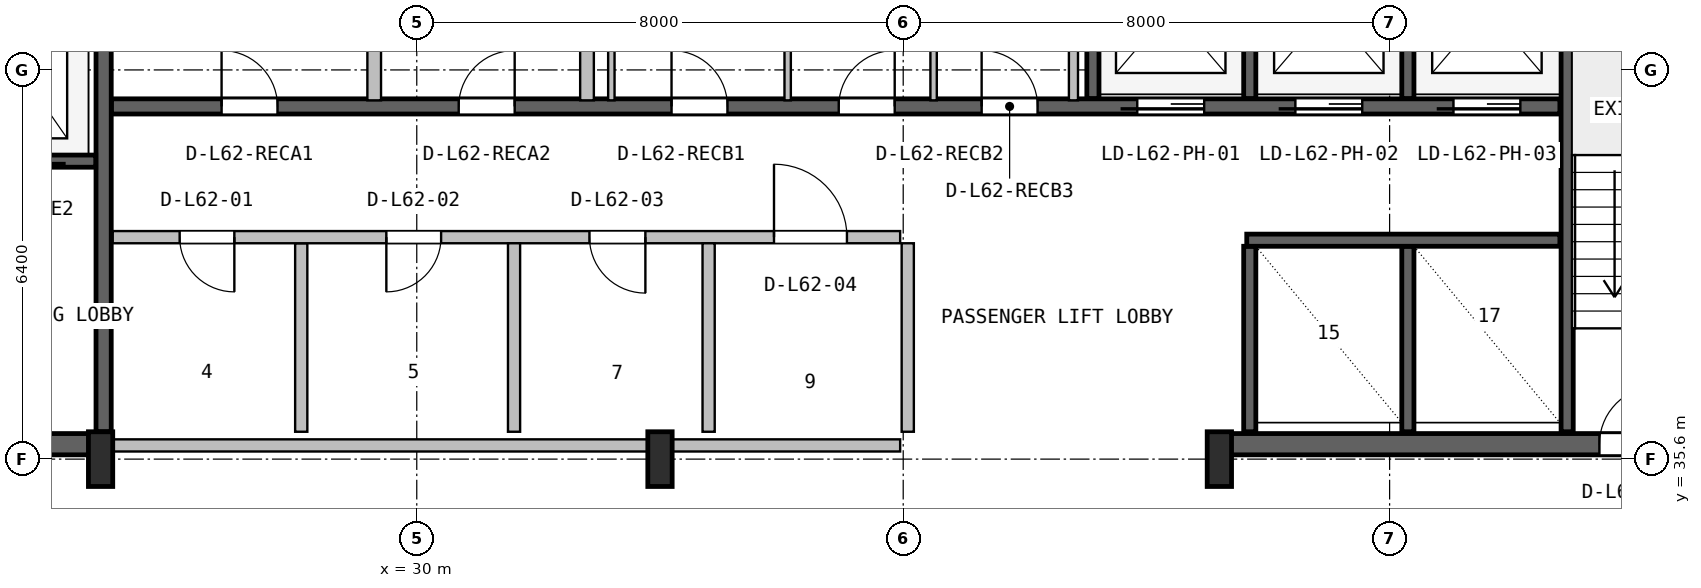
"""IFC4 building model, lengths in metres.
Left out: names, types, materials, properties, quantities, classifications, styles, units other than length and angle.
Written with IfcOpenShell. Run it as: python <this file> out.ifc"""

import sys

from ifc_helpers import new_model, si_unit, direction, frame, frame_2d, origin, origin_2d, place, context, subcontext, project, spatial, rectangle, i_section, extrude, source, transform, mapped, element, fill, save


model = new_model("IFC4")
c1 = context("Model", 3, precision=1e-05, world=origin(), true_north=direction((0.0, 1.0)))
c2 = subcontext(c1, "Body", "Model", "MODEL_VIEW")
j1 = project(units=[si_unit("LENGTHUNIT", "METRE"), si_unit("PLANEANGLEUNIT", "RADIAN")], contexts=[c1])
p1 = place(None, origin())
s1 = spatial("IfcSite", under=j1, at=p1, CompositionType="ELEMENT")
p2 = place(p1, origin())
s2 = spatial("IfcBuilding", under=s1, at=p2, CompositionType="ELEMENT")
p3 = place(p2, frame((0.0, 0.0, 250.8)))
s3 = spatial("IfcBuildingStorey", under=s2, at=p3, CompositionType="ELEMENT", Elevation=250.8)
p4 = place(p3, frame((15.67, 35.845, 0.0), z_axis=(0.0, 0.0, 1.0), x_axis=(1.0, 0.0, 0.0)))
e1 = element("IfcWall", 1, at=p4, inside=s3, PredefinedType="SHEAR", context=c2, shape_type="SweptSolid", body=[
    extrude(rectangle(XDim=9.13, YDim=0.35, at=frame_2d((4.565, 0.0))), origin(), (0.0, 0.0, 1.0), 3.55),
])
p5 = place(p4, frame((5.4, 0.0, 0.0)))
e2 = element("IfcOpeningElement", 2, at=p5, cuts=e1, PredefinedType="OPENING", context=c2, shape_type="SweptSolid", body=[
    extrude(rectangle(XDim=1.0, YDim=2.1, at=frame_2d((0.5, 1.05))), frame((0.0, 0.185, 0.0), z_axis=(0.0, -1.0, 0.0), x_axis=(1.0, 0.0, 0.0)), (0.0, 0.0, 1.0), 0.37),
])
p6 = place(p3, frame((43.2, 35.845, 0.0), z_axis=(0.0, 0.0, 1.0), x_axis=(1.0, 0.0, 0.0)))
e3 = element("IfcWall", 3, at=p6, inside=s3, PredefinedType="SHEAR", context=c2, shape_type="SweptSolid", body=[
    extrude(rectangle(XDim=9.13, YDim=0.35, at=frame_2d((4.565, 0.0))), origin(), (0.0, 0.0, 1.0), 3.55),
])
p7 = place(p6, frame((6.25, 0.0, 0.0)))
e4 = element("IfcOpeningElement", 4, at=p7, cuts=e3, PredefinedType="OPENING", context=c2, shape_type="SweptSolid", body=[
    extrude(rectangle(XDim=0.95, YDim=2.1, at=frame_2d((0.475, 1.05))), frame((0.0, 0.185, 0.0), z_axis=(0.0, -1.0, 0.0), x_axis=(1.0, 0.0, 0.0)), (0.0, 0.0, 1.0), 0.37),
])
m1 = source(origin(), c2, "Body", "SweptSolid", [
    extrude(i_section(OverallWidth=0.4, OverallDepth=0.9, WebThickness=0.016, FlangeThickness=0.028, FilletRadius=0.016, at=origin_2d()), origin(), (0.0, 0.0, 1.0), 3.8),
])
for number, where, z_axis, x_axis in (
    (5, (24.8, 35.6, 0.0), (0.0, 0.0, 1.0), (1.0, 0.0, 0.0)),
    (6, (34.0, 35.6, 0.0), (0.0, 0.0, 1.0), (1.0, 0.0, 0.0)),
    (7, (43.2, 35.6, 0.0), (0.0, 0.0, 1.0), (1.0, 0.0, 0.0)),
):
    element("IfcColumn", number, at=place(p3, frame(where, z_axis=z_axis, x_axis=x_axis)), inside=s3, PredefinedType="COLUMN", context=c2, shape_type="MappedRepresentation", body=[
        mapped(m1, transform((0.0, 0.0, 0.0), x_axis=(1.0, 0.0, 0.0), y_axis=(0.0, 1.0, 0.0), z_axis=(0.0, 0.0, 1.0), scale=1.0)),
    ])
p8 = place(p3, frame((24.85, 36.05, 0.0), z_axis=(0.0, 0.0, 1.0), x_axis=(0.0, 1.0, 0.0)))
e8 = element("IfcWall", 8, at=p8, inside=s3, PredefinedType="SHEAR", context=c2, shape_type="SweptSolid", body=[
    extrude(rectangle(XDim=10.45, YDim=0.25, at=frame_2d((5.225, 0.0))), origin(), (0.0, 0.0, 1.0), 3.55),
])
p9 = place(p3, frame((19.2, 40.5, 0.0), z_axis=(0.0, 0.0, 1.0), x_axis=(1.0, 0.0, 0.0)))
e9 = element("IfcWall", 9, at=p9, inside=s3, PredefinedType="SHEAR", context=c2, shape_type="SweptSolid", body=[
    extrude(rectangle(XDim=5.52, YDim=0.2, at=frame_2d((2.76, 0.0))), origin(), (0.0, 0.0, 1.0), 3.55),
])
p10 = place(p9, frame((1.05, 0.0, 0.0)))
e10 = element("IfcOpeningElement", 10, at=p10, cuts=e9, PredefinedType="OPENING", context=c2, shape_type="SweptSolid", body=[
    extrude(rectangle(XDim=1.1, YDim=2.18, at=frame_2d((0.55, 1.09))), frame((0.0, 0.11, 0.0), z_axis=(0.0, -1.0, 0.0), x_axis=(1.0, 0.0, 0.0)), (0.0, 0.0, 1.0), 0.22),
])
p11 = place(p9, frame((3.65, 0.0, 0.0)))
e11 = element("IfcOpeningElement", 11, at=p11, cuts=e9, PredefinedType="OPENING", context=c2, shape_type="SweptSolid", body=[
    extrude(rectangle(XDim=1.1, YDim=2.18, at=frame_2d((0.55, 1.09))), frame((0.0, 0.11, 0.0), z_axis=(0.0, -1.0, 0.0), x_axis=(1.0, 0.0, 0.0)), (0.0, 0.0, 1.0), 0.22),
])
p12 = place(p3, frame((48.92, 36.05, 0.0), z_axis=(0.0, 0.0, 1.0), x_axis=(0.0, 1.0, 0.0)))
e12 = element("IfcWall", 12, at=p12, inside=s3, PredefinedType="SHEAR", context=c2, shape_type="SweptSolid", body=[
    extrude(rectangle(XDim=10.5, YDim=0.2, at=frame_2d((5.25, 0.0))), origin(), (0.0, 0.0, 1.0), 3.55),
])
p13 = place(p3, frame((24.98, 41.4, 0.0), z_axis=(0.0, 0.0, 1.0), x_axis=(1.0, 0.0, 0.0)))
e13 = element("IfcWall", 13, at=p13, inside=s3, PredefinedType="SHEAR", context=c2, shape_type="SweptSolid", body=[
    extrude(rectangle(XDim=23.82, YDim=0.25, at=frame_2d((11.91, 0.0))), origin(), (0.0, 0.0, 1.0), 3.55),
])
p14 = place(p13, frame((16.87, 0.0, 0.0)))
e14 = element("IfcOpeningElement", 14, at=p14, cuts=e13, PredefinedType="OPENING", context=c2, shape_type="SweptSolid", body=[
    extrude(rectangle(XDim=1.1, YDim=2.18, at=frame_2d((0.55, 1.09))), frame((0.0, 0.135, 0.0), z_axis=(0.0, -1.0, 0.0), x_axis=(1.0, 0.0, 0.0)), (0.0, 0.0, 1.0), 0.27),
])
p15 = place(p13, frame((19.47, 0.0, 0.0)))
e15 = element("IfcOpeningElement", 15, at=p15, cuts=e13, PredefinedType="OPENING", context=c2, shape_type="SweptSolid", body=[
    extrude(rectangle(XDim=1.1, YDim=2.18, at=frame_2d((0.55, 1.09))), frame((0.0, 0.135, 0.0), z_axis=(0.0, -1.0, 0.0), x_axis=(1.0, 0.0, 0.0)), (0.0, 0.0, 1.0), 0.27),
])
p16 = place(p13, frame((22.07, 0.0, 0.0)))
e16 = element("IfcOpeningElement", 16, at=p16, cuts=e13, PredefinedType="OPENING", context=c2, shape_type="SweptSolid", body=[
    extrude(rectangle(XDim=1.1, YDim=2.18, at=frame_2d((0.55, 1.09))), frame((0.0, 0.135, 0.0), z_axis=(0.0, -1.0, 0.0), x_axis=(1.0, 0.0, 0.0)), (0.0, 0.0, 1.0), 0.27),
])
p17 = place(p13, frame((1.81, 0.0, 0.0)))
e17 = element("IfcOpeningElement", 17, at=p17, cuts=e13, PredefinedType="OPENING", context=c2, shape_type="SweptSolid", body=[
    extrude(rectangle(XDim=0.92, YDim=2.08, at=frame_2d((0.46, 1.04))), frame((0.0, 0.135, 0.0), z_axis=(0.0, -1.0, 0.0), x_axis=(1.0, 0.0, 0.0)), (0.0, 0.0, 1.0), 0.27),
])
p18 = place(p13, frame((5.71, 0.0, 0.0)))
e18 = element("IfcOpeningElement", 18, at=p18, cuts=e13, PredefinedType="OPENING", context=c2, shape_type="SweptSolid", body=[
    extrude(rectangle(XDim=0.92, YDim=2.08, at=frame_2d((0.46, 1.04))), frame((0.0, 0.135, 0.0), z_axis=(0.0, -1.0, 0.0), x_axis=(1.0, 0.0, 0.0)), (0.0, 0.0, 1.0), 0.27),
])
p19 = place(p13, frame((9.21, 0.0, 0.0)))
e19 = element("IfcOpeningElement", 19, at=p19, cuts=e13, PredefinedType="OPENING", context=c2, shape_type="SweptSolid", body=[
    extrude(rectangle(XDim=0.92, YDim=2.08, at=frame_2d((0.46, 1.04))), frame((0.0, 0.135, 0.0), z_axis=(0.0, -1.0, 0.0), x_axis=(1.0, 0.0, 0.0)), (0.0, 0.0, 1.0), 0.27),
])
p20 = place(p13, frame((11.96, 0.0, 0.0)))
e20 = element("IfcOpeningElement", 20, at=p20, cuts=e13, PredefinedType="OPENING", context=c2, shape_type="SweptSolid", body=[
    extrude(rectangle(XDim=0.92, YDim=2.08, at=frame_2d((0.46, 1.04))), frame((0.0, 0.135, 0.0), z_axis=(0.0, -1.0, 0.0), x_axis=(1.0, 0.0, 0.0)), (0.0, 0.0, 1.0), 0.27),
])
p21 = place(p13, frame((14.31, 0.0, 0.0)))
e21 = element("IfcOpeningElement", 21, at=p21, cuts=e13, PredefinedType="OPENING", context=c2, shape_type="SweptSolid", body=[
    extrude(rectangle(XDim=0.92, YDim=2.08, at=frame_2d((0.46, 1.04))), frame((0.0, 0.135, 0.0), z_axis=(0.0, -1.0, 0.0), x_axis=(1.0, 0.0, 0.0)), (0.0, 0.0, 1.0), 0.27),
])
p22 = place(p3, frame((41.12, 41.53, 0.0), z_axis=(0.0, 0.0, 1.0), x_axis=(0.0, 1.0, 0.0)))
e22 = element("IfcWall", 22, at=p22, inside=s3, PredefinedType="SHEAR", context=c2, shape_type="SweptSolid", body=[
    extrude(rectangle(XDim=5.02, YDim=0.2, at=frame_2d((2.51, 0.0))), origin(), (0.0, 0.0, 1.0), 3.55),
])
for number, where, z_axis, x_axis in (
    (23, (43.7, 41.53, 0.0), (0.0, 0.0, 1.0), (0.0, 1.0, 0.0)),
    (24, (46.3, 41.53, 0.0), (0.0, 0.0, 1.0), (0.0, 1.0, 0.0)),
):
    element("IfcWall", number, at=place(p3, frame(where, z_axis=z_axis, x_axis=x_axis)), inside=s3, PredefinedType="SHEAR", context=c2, shape_type="SweptSolid", body=[
        extrude(rectangle(XDim=2.87, YDim=0.2, at=frame_2d((1.435, 0.0))), origin(), (0.0, 0.0, 1.0), 3.55),
    ])
for number, where, z_axis, x_axis in (
    (25, (43.7, 36.05, 0.0), (0.0, 0.0, 1.0), (0.0, 1.0, 0.0)),
    (26, (46.3, 36.05, 0.0), (0.0, 0.0, 1.0), (0.0, 1.0, 0.0)),
):
    element("IfcWall", number, at=place(p3, frame(where, z_axis=z_axis, x_axis=x_axis)), inside=s3, PredefinedType="SHEAR", context=c2, shape_type="SweptSolid", body=[
        extrude(rectangle(XDim=3.05, YDim=0.2, at=frame_2d((1.525, 0.0))), origin(), (0.0, 0.0, 1.0), 3.55),
    ])
p23 = place(p3, frame((43.65, 39.2, 0.0), z_axis=(0.0, 0.0, 1.0), x_axis=(1.0, 0.0, 0.0)))
e27 = element("IfcWall", 27, at=p23, inside=s3, PredefinedType="SHEAR", context=c2, shape_type="SweptSolid", body=[
    extrude(rectangle(XDim=5.15, YDim=0.2, at=frame_2d((2.575, 0.0))), origin(), (0.0, 0.0, 1.0), 3.55),
])
p24 = place(p3, frame((25.0, 35.825, 0.0), z_axis=(0.0, 0.0, 1.0), x_axis=(1.0, 0.0, 0.0)))
e28 = element("IfcWall", 28, at=p24, inside=s3, PredefinedType="SOLIDWALL", context=c2, shape_type="SweptSolid", body=[
    extrude(rectangle(XDim=12.95, YDim=0.2, at=frame_2d((6.475, 0.0))), origin(), (0.0, 0.0, 1.0), 2.575),
])
p25 = place(p3, frame((28.1, 36.05, 0.0), z_axis=(0.0, 0.0, 1.0), x_axis=(0.0, 1.0, 0.0)))
e29 = element("IfcWall", 29, at=p25, inside=s3, PredefinedType="PLUMBINGWALL", context=c2, shape_type="SweptSolid", body=[
    extrude(rectangle(XDim=3.1, YDim=0.2, at=frame_2d((1.55, 0.0))), origin(), (0.0, 0.0, 1.0), 3.53),
])
p26 = place(p3, frame((25.0, 39.25, 0.0), z_axis=(0.0, 0.0, 1.0), x_axis=(1.0, 0.0, 0.0)))
e30 = element("IfcWall", 30, at=p26, inside=s3, PredefinedType="SOLIDWALL", context=c2, shape_type="SweptSolid", body=[
    extrude(rectangle(XDim=12.95, YDim=0.2, at=frame_2d((6.475, 0.0))), origin(), (0.0, 0.0, 1.0), 3.53),
])
p27 = place(p26, frame((1.1, 0.0, 0.0)))
e31 = element("IfcOpeningElement", 31, at=p27, cuts=e30, PredefinedType="OPENING", context=c2, shape_type="SweptSolid", body=[
    extrude(rectangle(XDim=0.9, YDim=2.06, at=frame_2d((0.45, 1.03))), frame((0.0, 0.11, 0.0), z_axis=(0.0, -1.0, 0.0), x_axis=(1.0, 0.0, 0.0)), (0.0, 0.0, 1.0), 0.22),
])
p28 = place(p26, frame((4.5, 0.0, 0.0)))
e32 = element("IfcOpeningElement", 32, at=p28, cuts=e30, PredefinedType="OPENING", context=c2, shape_type="SweptSolid", body=[
    extrude(rectangle(XDim=0.9, YDim=2.06, at=frame_2d((0.45, 1.03))), frame((0.0, 0.11, 0.0), z_axis=(0.0, -1.0, 0.0), x_axis=(1.0, 0.0, 0.0)), (0.0, 0.0, 1.0), 0.22),
])
p29 = place(p26, frame((7.84, 0.0, 0.0)))
e33 = element("IfcOpeningElement", 33, at=p29, cuts=e30, PredefinedType="OPENING", context=c2, shape_type="SweptSolid", body=[
    extrude(rectangle(XDim=0.92, YDim=2.08, at=frame_2d((0.46, 1.04))), frame((0.0, 0.11, 0.0), z_axis=(0.0, -1.0, 0.0), x_axis=(1.0, 0.0, 0.0)), (0.0, 0.0, 1.0), 0.22),
])
p30 = place(p26, frame((10.875, 0.0, 0.0)))
e34 = element("IfcOpeningElement", 34, at=p30, cuts=e30, PredefinedType="OPENING", context=c2, shape_type="SweptSolid", body=[
    extrude(rectangle(XDim=1.2, YDim=2.1, at=frame_2d((0.6, 1.05))), frame((0.0, 0.11, 0.0), z_axis=(0.0, -1.0, 0.0), x_axis=(1.0, 0.0, 0.0)), (0.0, 0.0, 1.0), 0.22),
])
p31 = place(p3, frame((31.6, 36.05, 0.0), z_axis=(0.0, 0.0, 1.0), x_axis=(0.0, 1.0, 0.0)))
e35 = element("IfcWall", 35, at=p31, inside=s3, PredefinedType="PLUMBINGWALL", context=c2, shape_type="SweptSolid", body=[
    extrude(rectangle(XDim=3.1, YDim=0.2, at=frame_2d((1.55, 0.0))), origin(), (0.0, 0.0, 1.0), 3.53),
])
for number, where, z_axis, x_axis in (
    (36, (34.8, 36.05, 0.0), (0.0, 0.0, 1.0), (0.0, 1.0, 0.0)),
    (37, (38.075, 36.05, 0.0), (0.0, 0.0, 1.0), (0.0, 1.0, 0.0)),
):
    element("IfcWall", number, at=place(p3, frame(where, z_axis=z_axis, x_axis=x_axis)), inside=s3, PredefinedType="SOLIDWALL", context=c2, shape_type="SweptSolid", body=[
        extrude(rectangle(XDim=3.1, YDim=0.2, at=frame_2d((1.55, 0.0))), origin(), (0.0, 0.0, 1.0), 3.53),
    ])
p32 = place(p3, frame((29.3, 41.5, 0.0), z_axis=(0.0, 0.0, 1.0), x_axis=(0.0, 1.0, 0.0)))
e38 = element("IfcWall", 38, at=p32, inside=s3, PredefinedType="PARTITIONING", context=c2, shape_type="SweptSolid", body=[
    extrude(rectangle(XDim=2.288, YDim=0.225, at=frame_2d((1.144, 0.0))), origin(), (0.0, 0.0, 1.0), 3.53),
])
p33 = place(p3, frame((32.8, 41.5, 0.0), z_axis=(0.0, 0.0, 1.0), x_axis=(0.0, 1.0, 0.0)))
e39 = element("IfcWall", 39, at=p33, inside=s3, PredefinedType="PARTITIONING", context=c2, shape_type="SweptSolid", body=[
    extrude(rectangle(XDim=5.02, YDim=0.225, at=frame_2d((2.51, 0.0))), origin(), (0.0, 0.0, 1.0), 3.53),
])
for number, where, z_axis, x_axis in (
    (40, (36.1, 41.5, 0.0), (0.0, 0.0, 1.0), (0.0, 1.0, 0.0)),
    (41, (33.2, 41.5, 0.0), (0.0, 0.0, 1.0), (0.0, 1.0, 0.0)),
    (42, (38.5, 41.5, 0.0), (0.0, 0.0, 1.0), (0.0, 1.0, 0.0)),
):
    element("IfcWall", number, at=place(p3, frame(where, z_axis=z_axis, x_axis=x_axis)), inside=s3, PredefinedType="PARTITIONING", context=c2, shape_type="SweptSolid", body=[
        extrude(rectangle(XDim=5.02, YDim=0.105, at=frame_2d((2.51, 0.0))), origin(), (0.0, 0.0, 1.0), 3.53),
    ])
p34 = place(p3, frame((40.8, 41.5, 0.0), z_axis=(0.0, 0.0, 1.0), x_axis=(0.0, 1.0, 0.0)))
e43 = element("IfcWall", 43, at=p34, inside=s3, PredefinedType="PARTITIONING", context=c2, shape_type="SweptSolid", body=[
    extrude(rectangle(XDim=5.02, YDim=0.15, at=frame_2d((2.51, 0.0))), origin(), (0.0, 0.0, 1.0), 3.53),
])
m2 = source(origin(), c2, "Body", "SweptSolid", [
    extrude(rectangle(XDim=0.95, YDim=2.1, at=frame_2d((0.475, 1.05))), frame((0.0, 0.025, 0.0), z_axis=(0.0, -1.0, 0.0), x_axis=(1.0, 0.0, 0.0)), (0.0, 0.0, 1.0), 0.05),
])
p35 = place(p7, origin())
e44 = element("IfcDoor", 44, at=p35, inside=s3, OperationType="SINGLE_SWING_RIGHT", PredefinedType="DOOR", context=c2, shape_type="MappedRepresentation", body=[
    mapped(m2, transform((0.0, 0.0, 0.0), x_axis=(1.0, 0.0, 0.0), y_axis=(0.0, 1.0, 0.0), z_axis=(0.0, 0.0, 1.0), scale=1.0)),
])
fill(e4, e44)
m3 = source(origin(), c2, "Body", "SweptSolid", [
    extrude(rectangle(XDim=1.1, YDim=2.18, at=frame_2d((0.55, 1.09))), frame((0.0, 0.025, 0.0), z_axis=(0.0, -1.0, 0.0), x_axis=(1.0, 0.0, 0.0)), (0.0, 0.0, 1.0), 0.05),
])
p36 = place(p14, frame((1.1, 0.0, 0.0), z_axis=(0.0, 0.0, 1.0), x_axis=(-1.0, 0.0, 0.0)))
e45 = element("IfcDoor", 45, at=p36, inside=s3, OperationType="SLIDING_TO_LEFT", PredefinedType="DOOR", context=c2, shape_type="MappedRepresentation", body=[
    mapped(m3, transform((0.0, 0.0, 0.0), x_axis=(1.0, 0.0, 0.0), y_axis=(0.0, 1.0, 0.0), z_axis=(0.0, 0.0, 1.0), scale=1.0)),
])
fill(e14, e45)
p37 = place(p15, frame((1.1, 0.0, 0.0), z_axis=(0.0, 0.0, 1.0), x_axis=(-1.0, 0.0, 0.0)))
e46 = element("IfcDoor", 46, at=p37, inside=s3, OperationType="SLIDING_TO_LEFT", PredefinedType="DOOR", context=c2, shape_type="MappedRepresentation", body=[
    mapped(m3, transform((0.0, 0.0, 0.0), x_axis=(1.0, 0.0, 0.0), y_axis=(0.0, 1.0, 0.0), z_axis=(0.0, 0.0, 1.0), scale=1.0)),
])
fill(e15, e46)
p38 = place(p16, frame((1.1, 0.0, 0.0), z_axis=(0.0, 0.0, 1.0), x_axis=(-1.0, 0.0, 0.0)))
e47 = element("IfcDoor", 47, at=p38, inside=s3, OperationType="SLIDING_TO_LEFT", PredefinedType="DOOR", context=c2, shape_type="MappedRepresentation", body=[
    mapped(m3, transform((0.0, 0.0, 0.0), x_axis=(1.0, 0.0, 0.0), y_axis=(0.0, 1.0, 0.0), z_axis=(0.0, 0.0, 1.0), scale=1.0)),
])
fill(e16, e47)
m4 = source(origin(), c2, "Body", "SweptSolid", [
    extrude(rectangle(XDim=0.92, YDim=2.08, at=frame_2d((0.46, 1.04))), frame((0.0, 0.025, 0.0), z_axis=(0.0, -1.0, 0.0), x_axis=(1.0, 0.0, 0.0)), (0.0, 0.0, 1.0), 0.05),
])
p39 = place(p17, origin())
e48 = element("IfcDoor", 48, at=p39, inside=s3, OperationType="SINGLE_SWING_LEFT", PredefinedType="DOOR", context=c2, shape_type="MappedRepresentation", body=[
    mapped(m4, transform((0.0, 0.0, 0.0), x_axis=(1.0, 0.0, 0.0), y_axis=(0.0, 1.0, 0.0), z_axis=(0.0, 0.0, 1.0), scale=1.0)),
])
fill(e17, e48)
p40 = place(p18, origin())
e49 = element("IfcDoor", 49, at=p40, inside=s3, OperationType="SINGLE_SWING_RIGHT", PredefinedType="DOOR", context=c2, shape_type="MappedRepresentation", body=[
    mapped(m4, transform((0.0, 0.0, 0.0), x_axis=(1.0, 0.0, 0.0), y_axis=(0.0, 1.0, 0.0), z_axis=(0.0, 0.0, 1.0), scale=1.0)),
])
fill(e18, e49)
p41 = place(p19, origin())
e50 = element("IfcDoor", 50, at=p41, inside=s3, OperationType="SINGLE_SWING_LEFT", PredefinedType="DOOR", context=c2, shape_type="MappedRepresentation", body=[
    mapped(m4, transform((0.0, 0.0, 0.0), x_axis=(1.0, 0.0, 0.0), y_axis=(0.0, 1.0, 0.0), z_axis=(0.0, 0.0, 1.0), scale=1.0)),
])
fill(e19, e50)
p42 = place(p20, origin())
e51 = element("IfcDoor", 51, at=p42, inside=s3, OperationType="SINGLE_SWING_RIGHT", PredefinedType="DOOR", context=c2, shape_type="MappedRepresentation", body=[
    mapped(m4, transform((0.0, 0.0, 0.0), x_axis=(1.0, 0.0, 0.0), y_axis=(0.0, 1.0, 0.0), z_axis=(0.0, 0.0, 1.0), scale=1.0)),
])
fill(e20, e51)
p43 = place(p21, origin())
e52 = element("IfcDoor", 52, at=p43, inside=s3, OperationType="SINGLE_SWING_LEFT", PredefinedType="DOOR", context=c2, shape_type="MappedRepresentation", body=[
    mapped(m4, transform((0.0, 0.0, 0.0), x_axis=(1.0, 0.0, 0.0), y_axis=(0.0, 1.0, 0.0), z_axis=(0.0, 0.0, 1.0), scale=1.0)),
])
fill(e21, e52)
m5 = source(origin(), c2, "Body", "SweptSolid", [
    extrude(rectangle(XDim=0.9, YDim=2.06, at=frame_2d((0.45, 1.03))), frame((0.0, 0.025, 0.0), z_axis=(0.0, -1.0, 0.0), x_axis=(1.0, 0.0, 0.0)), (0.0, 0.0, 1.0), 0.05),
])
p44 = place(p27, frame((0.9, 0.0, 0.0), z_axis=(0.0, 0.0, 1.0), x_axis=(-1.0, 0.0, 0.0)))
e53 = element("IfcDoor", 53, at=p44, inside=s3, OperationType="SINGLE_SWING_RIGHT", PredefinedType="DOOR", context=c2, shape_type="MappedRepresentation", body=[
    mapped(m5, transform((0.0, 0.0, 0.0), x_axis=(1.0, 0.0, 0.0), y_axis=(0.0, 1.0, 0.0), z_axis=(0.0, 0.0, 1.0), scale=1.0)),
])
fill(e31, e53)
p45 = place(p28, frame((0.9, 0.0, 0.0), z_axis=(0.0, 0.0, 1.0), x_axis=(-1.0, 0.0, 0.0)))
e54 = element("IfcDoor", 54, at=p45, inside=s3, OperationType="SINGLE_SWING_LEFT", PredefinedType="DOOR", context=c2, shape_type="MappedRepresentation", body=[
    mapped(m5, transform((0.0, 0.0, 0.0), x_axis=(1.0, 0.0, 0.0), y_axis=(0.0, 1.0, 0.0), z_axis=(0.0, 0.0, 1.0), scale=1.0)),
])
fill(e32, e54)
p46 = place(p29, frame((0.92, 0.0, 0.0), z_axis=(0.0, 0.0, 1.0), x_axis=(-1.0, 0.0, 0.0)))
e55 = element("IfcDoor", 55, at=p46, inside=s3, OperationType="SINGLE_SWING_RIGHT", PredefinedType="DOOR", context=c2, shape_type="MappedRepresentation", body=[
    mapped(m4, transform((0.0, 0.0, 0.0), x_axis=(1.0, 0.0, 0.0), y_axis=(0.0, 1.0, 0.0), z_axis=(0.0, 0.0, 1.0), scale=1.0)),
])
fill(e33, e55)
m6 = source(origin(), c2, "Body", "SweptSolid", [
    extrude(rectangle(XDim=1.2, YDim=2.1, at=frame_2d((0.6, 1.05))), frame((0.0, 0.025, 0.0), z_axis=(0.0, -1.0, 0.0), x_axis=(1.0, 0.0, 0.0)), (0.0, 0.0, 1.0), 0.05),
])
p47 = place(p30, origin())
e56 = element("IfcDoor", 56, at=p47, inside=s3, OperationType="SINGLE_SWING_LEFT", PredefinedType="DOOR", context=c2, shape_type="MappedRepresentation", body=[
    mapped(m6, transform((0.0, 0.0, 0.0), x_axis=(1.0, 0.0, 0.0), y_axis=(0.0, 1.0, 0.0), z_axis=(0.0, 0.0, 1.0), scale=1.0)),
])
fill(e34, e56)
save(model, sys.argv[1])
